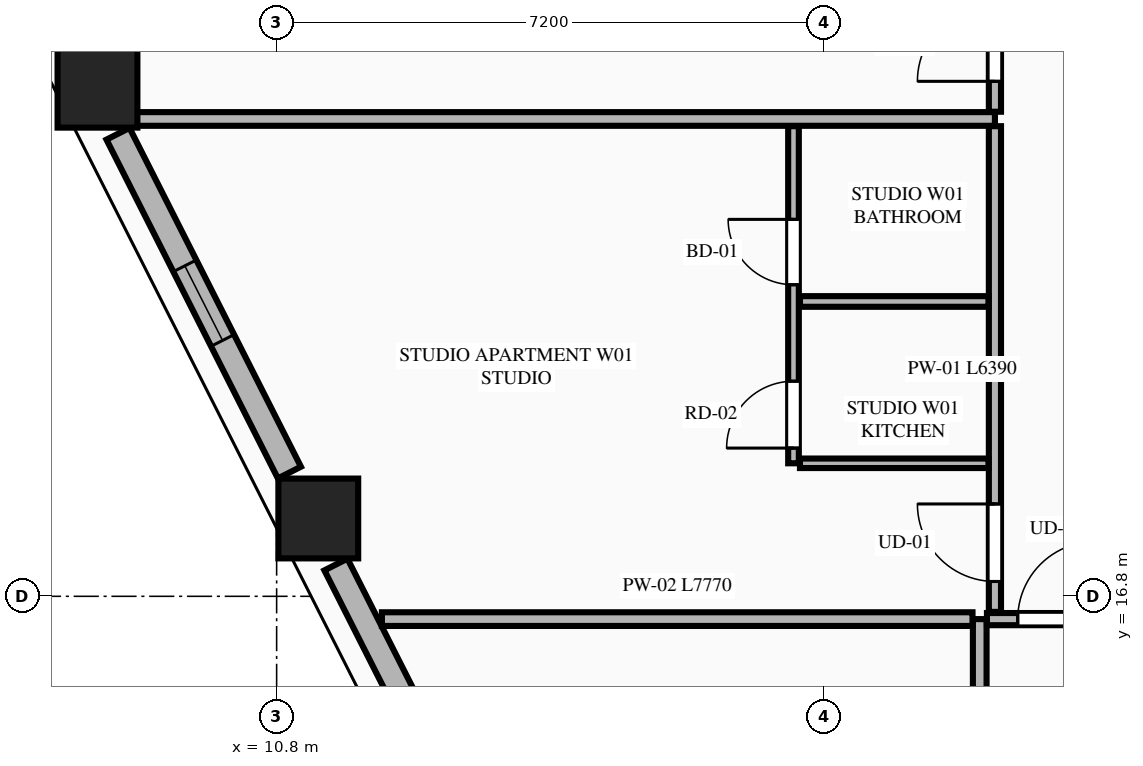
"""IFC4 building model, lengths in metres.
Left out: names, types, materials, properties, quantities, classifications, styles, units other than length and angle.
Written with IfcOpenShell. Run it as: python <this file> out.ifc"""

import sys

from ifc_helpers import new_model, si_unit, direction, frame, frame_2d, origin, origin_2d, place, context, subcontext, project, spatial, rectangle, extrude, element, fill, save


model = new_model("IFC4")
c1 = context("Model", 3, precision=1e-05, world=origin(), true_north=direction((0.0, 1.0)))
c2 = subcontext(c1, "Body", "Model", "MODEL_VIEW")
j1 = project(units=[si_unit("LENGTHUNIT", "METRE"), si_unit("PLANEANGLEUNIT", "RADIAN")], contexts=[c1])
p1 = place(None, origin())
s1 = spatial("IfcSite", under=j1, at=p1, CompositionType="ELEMENT")
p2 = place(p1, origin())
s2 = spatial("IfcBuilding", under=s1, at=p2, CompositionType="ELEMENT")
p3 = place(p2, frame((0.0, 0.0, 116.15)))
s3 = spatial("IfcBuildingStorey", under=s2, at=p3, CompositionType="ELEMENT", Elevation=116.15)
for number, where, z_axis, x_axis in (
    (1, (8.443, 23.491, 0.0), (0.0, 0.0, 1.0), (1.0, 0.0, 0.0)),
    (2, (11.348, 17.824, 0.0), (0.0, 0.0, 1.0), (1.0, 0.0, 0.0)),
):
    element("IfcColumn", number, at=place(p3, frame(where, z_axis=z_axis, x_axis=x_axis)), inside=s3, PredefinedType="COLUMN", context=c2, shape_type="SweptSolid", body=[
        extrude(rectangle(XDim=1.05, YDim=1.05, at=origin_2d()), origin(), (0.0, 0.0, 1.0), 3.55),
    ])
p4 = place(p3, frame((8.713, 22.885, 0.0), z_axis=(0.0, 0.0, 1.0), x_axis=(0.451470533039, -0.892286029139, 0.0)))
e3 = element("IfcWall", 3, at=p4, inside=s3, PredefinedType="STANDARD", context=c2, shape_type="SweptSolid", body=[
    extrude(rectangle(XDim=4.995, YDim=0.34, at=frame_2d((2.498, 0.0))), origin(), (0.0, 0.0, 1.0), 2.797),
])
p5 = place(p4, frame((1.947, 0.0, 0.75)))
e4 = element("IfcOpeningElement", 4, at=p5, cuts=e3, PredefinedType="OPENING", context=c2, shape_type="SweptSolid", body=[
    extrude(rectangle(XDim=1.1, YDim=1.897, at=frame_2d((0.55, 0.948))), frame((0.0, 0.18, 0.0), z_axis=(0.0, -1.0, 0.0), x_axis=(1.0, 0.0, 0.0)), (0.0, 0.0, 1.0), 0.36),
])
p6 = place(p3, frame((11.58, 17.218, 0.0), z_axis=(0.0, 0.0, 1.0), x_axis=(0.451567731634, -0.892236842855, 0.0)))
e5 = element("IfcWall", 5, at=p6, inside=s3, PredefinedType="STANDARD", context=c2, shape_type="SweptSolid", body=[
    extrude(rectangle(XDim=5.219, YDim=0.34, at=frame_2d((2.61, 0.0))), origin(), (0.0, 0.0, 1.0), 2.797),
])
p7 = place(p6, frame((2.06, 0.0, 0.75)))
e6 = element("IfcOpeningElement", 6, at=p7, cuts=e5, PredefinedType="OPENING", context=c2, shape_type="SweptSolid", body=[
    extrude(rectangle(XDim=1.1, YDim=1.897, at=frame_2d((0.55, 0.948))), frame((0.0, 0.18, 0.0), z_axis=(0.0, -1.0, 0.0), x_axis=(1.0, 0.0, 0.0)), (0.0, 0.0, 1.0), 0.36),
])
p8 = place(p3, frame((20.05, 4.105, 0.0), z_axis=(0.0, 0.0, 1.0), x_axis=(0.0, 1.0, 0.0)))
e7 = element("IfcWall", 7, at=p8, inside=s3, PredefinedType="PARTITIONING", context=c2, shape_type="SweptSolid", body=[
    extrude(rectangle(XDim=12.395, YDim=0.18, at=frame_2d((6.198, 0.0))), origin(), (0.0, 0.0, 1.0), 3.34),
])
p9 = place(p3, frame((20.145, 16.5, 0.0), z_axis=(0.0, 0.0, 1.0), x_axis=(1.0, 0.0, 0.0)))
e8 = element("IfcWall", 8, at=p9, inside=s3, PredefinedType="PARTITIONING", context=c2, shape_type="SweptSolid", body=[
    extrude(rectangle(XDim=8.328, YDim=0.16, at=frame_2d((4.164, 0.0))), origin(), (0.0, 0.0, 1.0), 3.34),
])
p10 = place(p9, frame((0.405, 0.0, 0.0)))
e9 = element("IfcOpeningElement", 9, at=p10, cuts=e8, PredefinedType="OPENING", context=c2, shape_type="SweptSolid", body=[
    extrude(rectangle(XDim=1.02, YDim=2.25, at=frame_2d((0.51, 1.125))), frame((0.0, 0.09, 0.0), z_axis=(0.0, -1.0, 0.0), x_axis=(1.0, 0.0, 0.0)), (0.0, 0.0, 1.0), 0.18),
])
p11 = place(p3, frame((12.185, 16.5, 0.0), z_axis=(0.0, 0.0, 1.0), x_axis=(1.0, 0.0, 0.0)))
e10 = element("IfcWall", 10, at=p11, inside=s3, PredefinedType="PARTITIONING", context=c2, shape_type="SweptSolid", body=[
    extrude(rectangle(XDim=7.77, YDim=0.18, at=frame_2d((3.885, 0.0))), origin(), (0.0, 0.0, 1.0), 3.34),
])
p12 = place(p3, frame((20.25, 16.595, 0.0), z_axis=(0.0, 0.0, 1.0), x_axis=(0.0, 1.0, 0.0)))
e11 = element("IfcWall", 11, at=p12, inside=s3, PredefinedType="PARTITIONING", context=c2, shape_type="SweptSolid", body=[
    extrude(rectangle(XDim=6.39, YDim=0.16, at=frame_2d((3.195, 0.0))), origin(), (0.0, 0.0, 1.0), 3.34),
])
p13 = place(p12, frame((0.4, 0.0, 0.0)))
e12 = element("IfcOpeningElement", 12, at=p13, cuts=e11, PredefinedType="OPENING", context=c2, shape_type="SweptSolid", body=[
    extrude(rectangle(XDim=1.02, YDim=2.25, at=frame_2d((0.51, 1.125))), frame((0.0, 0.09, 0.0), z_axis=(0.0, -1.0, 0.0), x_axis=(1.0, 0.0, 0.0)), (0.0, 0.0, 1.0), 0.18),
])
p14 = place(p3, frame((17.685, 18.55, 0.0), z_axis=(0.0, 0.0, 1.0), x_axis=(1.0, 0.0, 0.0)))
e13 = element("IfcWall", 13, at=p14, inside=s3, PredefinedType="PARTITIONING", context=c2, shape_type="SweptSolid", body=[
    extrude(rectangle(XDim=2.48, YDim=0.125, at=frame_2d((1.24, 0.0))), origin(), (0.0, 0.0, 1.0), 2.722),
])
p15 = place(p3, frame((17.6, 18.55, 0.0), z_axis=(0.0, 0.0, 1.0), x_axis=(0.0, 1.0, 0.0)))
e14 = element("IfcWall", 14, at=p15, inside=s3, PredefinedType="PLUMBINGWALL", context=c2, shape_type="SweptSolid", body=[
    extrude(rectangle(XDim=4.435, YDim=0.14, at=frame_2d((2.218, 0.0))), origin(), (0.0, 0.0, 1.0), 3.34),
])
p16 = place(p15, frame((2.349, 0.0, 0.0)))
e15 = element("IfcOpeningElement", 15, at=p16, cuts=e14, PredefinedType="OPENING", context=c2, shape_type="SweptSolid", body=[
    extrude(rectangle(XDim=0.86, YDim=2.1, at=frame_2d((0.43, 1.05))), frame((0.0, 0.08, 0.0), z_axis=(0.0, -1.0, 0.0), x_axis=(1.0, 0.0, 0.0)), (0.0, 0.0, 1.0), 0.16),
])
p17 = place(p15, frame((0.2, 0.0, 0.0)))
e16 = element("IfcOpeningElement", 16, at=p17, cuts=e14, PredefinedType="OPENING", context=c2, shape_type="SweptSolid", body=[
    extrude(rectangle(XDim=0.88, YDim=2.15, at=frame_2d((0.44, 1.075))), frame((0.0, 0.08, 0.0), z_axis=(0.0, -1.0, 0.0), x_axis=(1.0, 0.0, 0.0)), (0.0, 0.0, 1.0), 0.16),
])
p18 = place(p3, frame((17.685, 20.679, 0.0), z_axis=(0.0, 0.0, 1.0), x_axis=(1.0, 0.0, 0.0)))
e17 = element("IfcWall", 17, at=p18, inside=s3, PredefinedType="PLUMBINGWALL", context=c2, shape_type="SweptSolid", body=[
    extrude(rectangle(XDim=2.48, YDim=0.14, at=frame_2d((1.24, 0.0))), origin(), (0.0, 0.0, 1.0), 3.34),
])
p19 = place(p3, frame((8.856, 23.08, 0.0), z_axis=(0.0, 0.0, 1.0), x_axis=(1.0, 0.0, 0.0)))
e18 = element("IfcWall", 18, at=p19, inside=s3, PredefinedType="PARTITIONING", context=c2, shape_type="SweptSolid", body=[
    extrude(rectangle(XDim=11.394, YDim=0.18, at=frame_2d((5.697, 0.0))), origin(), (0.0, 0.0, 1.0), 3.34),
])
p20 = place(p3, frame((20.25, 23.175, 0.0), z_axis=(0.0, 0.0, 1.0), x_axis=(0.0, 1.0, 0.0)))
e19 = element("IfcWall", 19, at=p20, inside=s3, PredefinedType="PARTITIONING", context=c2, shape_type="SweptSolid", body=[
    extrude(rectangle(XDim=6.014, YDim=0.16, at=frame_2d((3.007, 0.0))), origin(), (0.0, 0.0, 1.0), 3.34),
])
p21 = place(p20, frame((0.4, 0.0, 0.0)))
e20 = element("IfcOpeningElement", 20, at=p21, cuts=e19, PredefinedType="OPENING", context=c2, shape_type="SweptSolid", body=[
    extrude(rectangle(XDim=1.02, YDim=2.25, at=frame_2d((0.51, 1.125))), frame((0.0, 0.09, 0.0), z_axis=(0.0, -1.0, 0.0), x_axis=(1.0, 0.0, 0.0)), (0.0, 0.0, 1.0), 0.18),
])
p22 = place(p5, origin())
e21 = element("IfcWindow", 21, at=p22, inside=s3, PartitioningType="SINGLE_PANEL", PredefinedType="WINDOW", context=c2, shape_type="SweptSolid", body=[
    extrude(rectangle(XDim=1.1, YDim=1.897, at=frame_2d((0.55, 0.948))), frame((0.0, 0.03, 0.0), z_axis=(0.0, -1.0, 0.0), x_axis=(1.0, 0.0, 0.0)), (0.0, 0.0, 1.0), 0.06),
])
fill(e4, e21)
p23 = place(p10, origin())
e22 = element("IfcDoor", 22, at=p23, inside=s3, OperationType="SINGLE_SWING_RIGHT", PredefinedType="DOOR", context=c2, shape_type="SweptSolid", body=[
    extrude(rectangle(XDim=1.02, YDim=2.25, at=frame_2d((0.51, 1.125))), frame((0.0, 0.025, 0.0), z_axis=(0.0, -1.0, 0.0), x_axis=(1.0, 0.0, 0.0)), (0.0, 0.0, 1.0), 0.05),
])
fill(e9, e22)
p24 = place(p16, origin())
e23 = element("IfcDoor", 23, at=p24, inside=s3, OperationType="SINGLE_SWING_RIGHT", PredefinedType="DOOR", context=c2, shape_type="SweptSolid", body=[
    extrude(rectangle(XDim=0.86, YDim=2.1, at=frame_2d((0.43, 1.05))), frame((0.0, 0.025, 0.0), z_axis=(0.0, -1.0, 0.0), x_axis=(1.0, 0.0, 0.0)), (0.0, 0.0, 1.0), 0.05),
])
fill(e15, e23)
p25 = place(p13, origin())
e24 = element("IfcDoor", 24, at=p25, inside=s3, OperationType="SINGLE_SWING_RIGHT", PredefinedType="DOOR", context=c2, shape_type="SweptSolid", body=[
    extrude(rectangle(XDim=1.02, YDim=2.25, at=frame_2d((0.51, 1.125))), frame((0.0, 0.025, 0.0), z_axis=(0.0, -1.0, 0.0), x_axis=(1.0, 0.0, 0.0)), (0.0, 0.0, 1.0), 0.05),
])
fill(e12, e24)
p26 = place(p17, origin())
e25 = element("IfcDoor", 25, at=p26, inside=s3, OperationType="SINGLE_SWING_LEFT", PredefinedType="DOOR", context=c2, shape_type="SweptSolid", body=[
    extrude(rectangle(XDim=0.88, YDim=2.15, at=frame_2d((0.44, 1.075))), frame((0.0, 0.025, 0.0), z_axis=(0.0, -1.0, 0.0), x_axis=(1.0, 0.0, 0.0)), (0.0, 0.0, 1.0), 0.05),
])
fill(e16, e25)
p27 = place(p21, origin())
e26 = element("IfcDoor", 26, at=p27, inside=s3, OperationType="SINGLE_SWING_LEFT", PredefinedType="DOOR", context=c2, shape_type="SweptSolid", body=[
    extrude(rectangle(XDim=1.02, YDim=2.25, at=frame_2d((0.51, 1.125))), frame((0.0, 0.025, 0.0), z_axis=(0.0, -1.0, 0.0), x_axis=(1.0, 0.0, 0.0)), (0.0, 0.0, 1.0), 0.05),
])
fill(e20, e26)
save(model, sys.argv[1])
